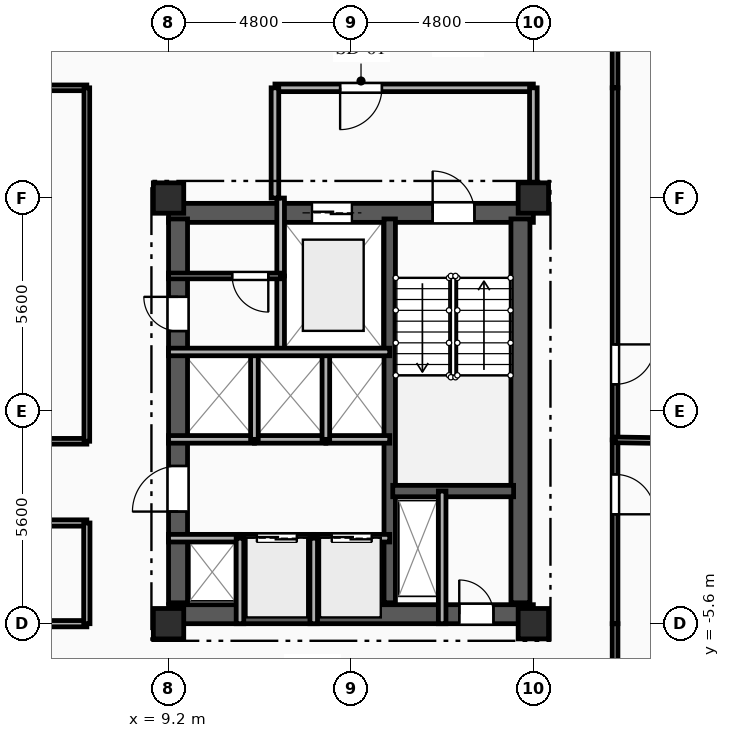
"""IFC4 building model, lengths in metres.
Left out: names, types, materials, properties, quantities, classifications, styles, units other than length and angle.
Written with IfcOpenShell. Run it as: python <this file> out.ifc"""

import sys

from ifc_helpers import new_model, si_unit, direction, frame, frame_2d, origin, origin_2d, place, context, subcontext, project, spatial, rectangle, extrude, element, fill, save


model = new_model("IFC4")
c1 = context("Model", 3, precision=1e-05, world=origin(), true_north=direction((0.0, 1.0)))
c2 = subcontext(c1, "Body", "Model", "MODEL_VIEW")
j1 = project(units=[si_unit("LENGTHUNIT", "METRE"), si_unit("PLANEANGLEUNIT", "RADIAN")], contexts=[c1])
p1 = place(None, origin())
s1 = spatial("IfcSite", under=j1, at=p1, CompositionType="ELEMENT")
p2 = place(p1, origin())
s2 = spatial("IfcBuilding", under=s1, at=p2, CompositionType="ELEMENT")
p3 = place(p2, frame((0.0, 0.0, 216.5)))
s3 = spatial("IfcBuildingStorey", under=s2, at=p3, CompositionType="ELEMENT", Elevation=216.5)
for number, where, z_axis, x_axis in (
    (1, (9.2, -5.6, 0.0), (0.0, 0.0, 1.0), (1.0, 0.0, 0.0)),
    (2, (9.2, 5.6, 0.0), (0.0, 0.0, 1.0), (1.0, 0.0, 0.0)),
    (3, (18.8, -5.6, 0.0), (0.0, 0.0, 1.0), (1.0, 0.0, 0.0)),
    (4, (18.8, 5.6, 0.0), (0.0, 0.0, 1.0), (1.0, 0.0, 0.0)),
):
    element("IfcColumn", number, at=place(p3, frame(where, z_axis=z_axis, x_axis=x_axis)), inside=s3, PredefinedType="COLUMN", context=c2, shape_type="SweptSolid", body=[
        extrude(rectangle(XDim=0.8, YDim=0.8, at=origin_2d()), origin(), (0.0, 0.0, 1.0), 3.35),
    ])
p4 = place(p3, frame((9.2, 5.21, 0.0), z_axis=(0.0, 0.0, 1.0), x_axis=(1.0, 0.0, 0.0)))
e5 = element("IfcWall", 5, at=p4, inside=s3, PredefinedType="SHEAR", context=c2, shape_type="SweptSolid", body=[
    extrude(rectangle(XDim=9.6, YDim=0.5, at=frame_2d((4.8, 0.0))), origin(), (0.0, 0.0, 1.0), 3.04),
])
p5 = place(p4, frame((6.95, 0.0, 0.0)))
e6 = element("IfcOpeningElement", 6, at=p5, cuts=e5, PredefinedType="OPENING", context=c2, shape_type="SweptSolid", body=[
    extrude(rectangle(XDim=1.1, YDim=2.15, at=frame_2d((0.55, 1.075))), frame((0.0, 0.26, 0.0), z_axis=(0.0, -1.0, 0.0), x_axis=(1.0, 0.0, 0.0)), (0.0, 0.0, 1.0), 0.52),
])
p6 = place(p4, frame((3.775, 0.0, 0.0)))
e7 = element("IfcOpeningElement", 7, at=p6, cuts=e5, PredefinedType="OPENING", context=c2, shape_type="SweptSolid", body=[
    extrude(rectangle(XDim=1.05, YDim=2.1, at=frame_2d((0.525, 1.05))), frame((0.0, 0.26, 0.0), z_axis=(0.0, -1.0, 0.0), x_axis=(1.0, 0.0, 0.0)), (0.0, 0.0, 1.0), 0.52),
])
p7 = place(p3, frame((9.2, -5.35, 0.0), z_axis=(0.0, 0.0, 1.0), x_axis=(1.0, 0.0, 0.0)))
e8 = element("IfcWall", 8, at=p7, inside=s3, PredefinedType="SHEAR", context=c2, shape_type="SweptSolid", body=[
    extrude(rectangle(XDim=9.6, YDim=0.5, at=frame_2d((4.8, 0.0))), origin(), (0.0, 0.0, 1.0), 3.04),
])
p8 = place(p7, frame((7.65, 0.0, 0.0)))
e9 = element("IfcOpeningElement", 9, at=p8, cuts=e8, PredefinedType="OPENING", context=c2, shape_type="SweptSolid", body=[
    extrude(rectangle(XDim=0.9, YDim=2.1, at=frame_2d((0.45, 1.05))), frame((0.0, 0.26, 0.0), z_axis=(0.0, -1.0, 0.0), x_axis=(1.0, 0.0, 0.0)), (0.0, 0.0, 1.0), 0.52),
])
p9 = place(p3, frame((9.45, -5.05, 0.0), z_axis=(0.0, 0.0, 1.0), x_axis=(0.0, 1.0, 0.0)))
e10 = element("IfcWall", 10, at=p9, inside=s3, PredefinedType="SHEAR", context=c2, shape_type="SweptSolid", body=[
    extrude(rectangle(XDim=10.1, YDim=0.5, at=frame_2d((5.05, 0.0))), origin(), (0.0, 0.0, 1.0), 3.04),
])
p10 = place(p9, frame((7.15, 0.0, 0.0)))
e11 = element("IfcOpeningElement", 11, at=p10, cuts=e10, PredefinedType="OPENING", context=c2, shape_type="SweptSolid", body=[
    extrude(rectangle(XDim=0.9, YDim=2.1, at=frame_2d((0.45, 1.05))), frame((0.0, 0.26, 0.0), z_axis=(0.0, -1.0, 0.0), x_axis=(1.0, 0.0, 0.0)), (0.0, 0.0, 1.0), 0.52),
])
p11 = place(p9, frame((2.4, 0.0, 0.0)))
e12 = element("IfcOpeningElement", 12, at=p11, cuts=e10, PredefinedType="OPENING", context=c2, shape_type="SweptSolid", body=[
    extrude(rectangle(XDim=1.2, YDim=2.15, at=frame_2d((0.6, 1.075))), frame((0.0, 0.26, 0.0), z_axis=(0.0, -1.0, 0.0), x_axis=(1.0, 0.0, 0.0)), (0.0, 0.0, 1.0), 0.52),
])
p12 = place(p3, frame((18.46, -5.05, 0.0), z_axis=(0.0, 0.0, 1.0), x_axis=(0.0, 1.0, 0.0)))
e13 = element("IfcWall", 13, at=p12, inside=s3, PredefinedType="SHEAR", context=c2, shape_type="SweptSolid", body=[
    extrude(rectangle(XDim=10.1, YDim=0.5, at=frame_2d((5.05, 0.0))), origin(), (0.0, 0.0, 1.0), 3.04),
])
p13 = place(p3, frame((15.02, -5.05, 0.0), z_axis=(0.0, 0.0, 1.0), x_axis=(0.0, 1.0, 0.0)))
e14 = element("IfcWall", 14, at=p13, inside=s3, PredefinedType="SHEAR", context=c2, shape_type="SweptSolid", body=[
    extrude(rectangle(XDim=10.1, YDim=0.3, at=frame_2d((5.05, 0.0))), origin(), (0.0, 0.0, 1.0), 3.04),
])
p14 = place(p3, frame((15.1, -2.11, 0.0), z_axis=(0.0, 0.0, 1.0), x_axis=(1.0, 0.0, 0.0)))
e15 = element("IfcWall", 15, at=p14, inside=s3, PredefinedType="SHEAR", context=c2, shape_type="SweptSolid", body=[
    extrude(rectangle(XDim=3.18, YDim=0.3, at=frame_2d((1.59, 0.0))), origin(), (0.0, 0.0, 1.0), 3.04),
])
p15 = place(p3, frame((16.4, -2.11, 0.0), z_axis=(0.0, 0.0, 1.0), x_axis=(0.0, -1.0, 0.0)))
e16 = element("IfcWall", 16, at=p15, inside=s3, PredefinedType="PARTITIONING", context=c2, shape_type="SweptSolid", body=[
    extrude(rectangle(XDim=3.49, YDim=0.2, at=frame_2d((1.745, 0.0))), origin(), (0.0, 0.0, 1.0), 3.04),
])
p16 = place(p3, frame((12.15, 3.55, 0.0), z_axis=(0.0, 0.0, 1.0), x_axis=(0.0, -1.0, 0.0)))
e17 = element("IfcWall", 17, at=p16, inside=s3, PredefinedType="PARTITIONING", context=c2, shape_type="SweptSolid", body=[
    extrude(rectangle(XDim=2.0, YDim=0.2, at=frame_2d((1.0, 0.0))), origin(), (0.0, 0.0, 1.0), 3.04),
])
p17 = place(p3, frame((12.15, 5.6, 0.0), z_axis=(0.0, 0.0, 1.0), x_axis=(0.0, -1.0, 0.0)))
e18 = element("IfcWall", 18, at=p17, inside=s3, PredefinedType="PARTITIONING", context=c2, shape_type="SweptSolid", body=[
    extrude(rectangle(XDim=2.05, YDim=0.2, at=frame_2d((1.025, 0.0))), origin(), (0.0, 0.0, 1.0), 3.04),
])
p18 = place(p3, frame((18.8, 8.5, 0.0), z_axis=(0.0, 0.0, 1.0), x_axis=(-1.0, 0.0, 0.0)))
e19 = element("IfcWall", 19, at=p18, inside=s3, PredefinedType="PARTITIONING", context=c2, shape_type="SweptSolid", body=[
    extrude(rectangle(XDim=6.8, YDim=0.2, at=frame_2d((3.4, 0.0))), origin(), (0.0, 0.0, 1.0), 3.04),
])
p19 = place(p18, frame((3.985, 0.0, 0.0)))
e20 = element("IfcOpeningElement", 20, at=p19, cuts=e19, PredefinedType="OPENING", context=c2, shape_type="SweptSolid", body=[
    extrude(rectangle(XDim=1.1, YDim=2.15, at=frame_2d((0.55, 1.075))), frame((0.0, 0.11, 0.0), z_axis=(0.0, -1.0, 0.0), x_axis=(1.0, 0.0, 0.0)), (0.0, 0.0, 1.0), 0.22),
])
p20 = place(p3, frame((18.8, 5.6, 0.0), z_axis=(0.0, 0.0, 1.0), x_axis=(0.0, 1.0, 0.0)))
e21 = element("IfcWall", 21, at=p20, inside=s3, PredefinedType="PARTITIONING", context=c2, shape_type="SweptSolid", body=[
    extrude(rectangle(XDim=2.9, YDim=0.2, at=frame_2d((1.45, 0.0))), origin(), (0.0, 0.0, 1.0), 2.665),
])
p21 = place(p3, frame((12.0, 8.5, 0.0), z_axis=(0.0, 0.0, 1.0), x_axis=(0.0, -1.0, 0.0)))
e22 = element("IfcWall", 22, at=p21, inside=s3, PredefinedType="PARTITIONING", context=c2, shape_type="SweptSolid", body=[
    extrude(rectangle(XDim=2.9, YDim=0.2, at=frame_2d((1.45, 0.0))), origin(), (0.0, 0.0, 1.0), 3.04),
])
p22 = place(p3, frame((12.15, 3.55, 0.0), z_axis=(0.0, 0.0, 1.0), x_axis=(-1.0, 0.0, 0.0)))
e23 = element("IfcWall", 23, at=p22, inside=s3, PredefinedType="PARTITIONING", context=c2, shape_type="SweptSolid", body=[
    extrude(rectangle(XDim=2.95, YDim=0.15, at=frame_2d((1.475, 0.0))), origin(), (0.0, 0.0, 1.0), 3.04),
])
p23 = place(p22, frame((0.325, 0.0, 0.0)))
e24 = element("IfcOpeningElement", 24, at=p23, cuts=e23, PredefinedType="OPENING", context=c2, shape_type="SweptSolid", body=[
    extrude(rectangle(XDim=0.95, YDim=2.1, at=frame_2d((0.475, 1.05))), frame((0.0, 0.085, 0.0), z_axis=(0.0, -1.0, 0.0), x_axis=(1.0, 0.0, 0.0)), (0.0, 0.0, 1.0), 0.17),
])
p24 = place(p3, frame((9.2, -3.35, 0.0), z_axis=(0.0, 0.0, 1.0), x_axis=(1.0, 0.0, 0.0)))
e25 = element("IfcWall", 25, at=p24, inside=s3, PredefinedType="PARTITIONING", context=c2, shape_type="SweptSolid", body=[
    extrude(rectangle(XDim=1.88, YDim=0.2, at=frame_2d((0.94, 0.0))), origin(), (0.0, 0.0, 1.0), 2.755),
])
p25 = place(p3, frame((11.08, -3.35, 0.0), z_axis=(0.0, 0.0, 1.0), x_axis=(1.0, 0.0, 0.0)))
e26 = element("IfcWall", 26, at=p25, inside=s3, PredefinedType="PARTITIONING", context=c2, shape_type="SweptSolid", body=[
    extrude(rectangle(XDim=1.94, YDim=0.2, at=frame_2d((0.97, 0.0))), origin(), (0.0, 0.0, 1.0), 3.04),
])
p26 = place(p25, frame((0.445, 0.0, 0.0)))
e27 = element("IfcOpeningElement", 27, at=p26, cuts=e26, PredefinedType="OPENING", context=c2, shape_type="SweptSolid", body=[
    extrude(rectangle(XDim=1.05, YDim=2.1, at=frame_2d((0.525, 1.05))), frame((0.0, 0.11, 0.0), z_axis=(0.0, -1.0, 0.0), x_axis=(1.0, 0.0, 0.0)), (0.0, 0.0, 1.0), 0.22),
])
p27 = place(p3, frame((13.02, -3.35, 0.0), z_axis=(0.0, 0.0, 1.0), x_axis=(1.0, 0.0, 0.0)))
e28 = element("IfcWall", 28, at=p27, inside=s3, PredefinedType="PARTITIONING", context=c2, shape_type="SweptSolid", body=[
    extrude(rectangle(XDim=2.0, YDim=0.2, at=frame_2d((1.0, 0.0))), origin(), (0.0, 0.0, 1.0), 3.04),
])
p28 = place(p27, frame((0.475, 0.0, 0.0)))
e29 = element("IfcOpeningElement", 29, at=p28, cuts=e28, PredefinedType="OPENING", context=c2, shape_type="SweptSolid", body=[
    extrude(rectangle(XDim=1.05, YDim=2.1, at=frame_2d((0.525, 1.05))), frame((0.0, 0.11, 0.0), z_axis=(0.0, -1.0, 0.0), x_axis=(1.0, 0.0, 0.0)), (0.0, 0.0, 1.0), 0.22),
])
p29 = place(p3, frame((11.46, -0.75, 0.0), z_axis=(0.0, 0.0, 1.0), x_axis=(-1.0, 0.0, 0.0)))
e30 = element("IfcWall", 30, at=p29, inside=s3, PredefinedType="PARTITIONING", context=c2, shape_type="SweptSolid", body=[
    extrude(rectangle(XDim=2.26, YDim=0.2, at=frame_2d((1.13, 0.0))), origin(), (0.0, 0.0, 1.0), 3.04),
])
p30 = place(p3, frame((13.34, -0.75, 0.0), z_axis=(0.0, 0.0, 1.0), x_axis=(-1.0, 0.0, 0.0)))
e31 = element("IfcWall", 31, at=p30, inside=s3, PredefinedType="PARTITIONING", context=c2, shape_type="SweptSolid", body=[
    extrude(rectangle(XDim=1.88, YDim=0.2, at=frame_2d((0.94, 0.0))), origin(), (0.0, 0.0, 1.0), 3.04),
])
p31 = place(p3, frame((15.02, -0.75, 0.0), z_axis=(0.0, 0.0, 1.0), x_axis=(-1.0, 0.0, 0.0)))
e32 = element("IfcWall", 32, at=p31, inside=s3, PredefinedType="PARTITIONING", context=c2, shape_type="SweptSolid", body=[
    extrude(rectangle(XDim=1.68, YDim=0.2, at=frame_2d((0.84, 0.0))), origin(), (0.0, 0.0, 1.0), 3.04),
])
for number, where, z_axis, x_axis in (
    (33, (11.08, -5.6, 0.0), (0.0, 0.0, 1.0), (0.0, 1.0, 0.0)),
    (34, (13.02, -5.6, 0.0), (0.0, 0.0, 1.0), (0.0, 1.0, 0.0)),
):
    element("IfcWall", number, at=place(p3, frame(where, z_axis=z_axis, x_axis=x_axis)), inside=s3, PredefinedType="PARTITIONING", context=c2, shape_type="SweptSolid", body=[
        extrude(rectangle(XDim=2.25, YDim=0.2, at=frame_2d((1.125, 0.0))), origin(), (0.0, 0.0, 1.0), 3.04),
    ])
for number, where, z_axis, x_axis in (
    (35, (11.46, -0.75, 0.0), (0.0, 0.0, 1.0), (0.0, 1.0, 0.0)),
    (36, (13.34, -0.75, 0.0), (0.0, 0.0, 1.0), (0.0, 1.0, 0.0)),
):
    element("IfcWall", number, at=place(p3, frame(where, z_axis=z_axis, x_axis=x_axis)), inside=s3, PredefinedType="PARTITIONING", context=c2, shape_type="SweptSolid", body=[
        extrude(rectangle(XDim=2.3, YDim=0.2, at=frame_2d((1.15, 0.0))), origin(), (0.0, 0.0, 1.0), 3.04),
    ])
p32 = place(p3, frame((20.95, 10.65, 0.0), z_axis=(0.0, 0.0, 1.0), x_axis=(0.0, -1.0, 0.0)))
e37 = element("IfcWall", 37, at=p32, inside=s3, PredefinedType="PARTITIONING", context=c2, shape_type="SweptSolid", body=[
    extrude(rectangle(XDim=2.15, YDim=0.15, at=frame_2d((1.075, 0.0))), origin(), (0.0, 0.0, 1.0), 3.04),
])
p33 = place(p3, frame((7.05, 8.5, 0.0), z_axis=(0.0, 0.0, 1.0), x_axis=(-1.0, 0.0, 0.0)))
e38 = element("IfcWall", 38, at=p33, inside=s3, PredefinedType="PARTITIONING", context=c2, shape_type="SweptSolid", body=[
    extrude(rectangle(XDim=7.05, YDim=0.15, at=frame_2d((3.525, 0.0))), origin(), (0.0, 0.0, 1.0), 3.04),
])
p34 = place(p3, frame((20.95, -5.6, 0.0), z_axis=(0.0, 0.0, 1.0), x_axis=(0.0, -1.0, 0.0)))
e39 = element("IfcWall", 39, at=p34, inside=s3, PredefinedType="PARTITIONING", context=c2, shape_type="SweptSolid", body=[
    extrude(rectangle(XDim=2.15, YDim=0.15, at=frame_2d((1.075, 0.0))), origin(), (0.0, 0.0, 1.0), 3.04),
])
p35 = place(p3, frame((0.0, -5.6, 0.0), z_axis=(0.0, 0.0, 1.0), x_axis=(1.0, 0.0, 0.0)))
e40 = element("IfcWall", 40, at=p35, inside=s3, PredefinedType="PARTITIONING", context=c2, shape_type="SweptSolid", body=[
    extrude(rectangle(XDim=7.05, YDim=0.165, at=frame_2d((3.525, 0.0))), origin(), (0.0, 0.0, 1.0), 2.525),
])
p36 = place(p3, frame((20.95, -0.763, 0.0), z_axis=(0.0, 0.0, 1.0), x_axis=(0.0, -1.0, 0.0)))
e41 = element("IfcWall", 41, at=p36, inside=s3, PredefinedType="PARTITIONING", context=c2, shape_type="SweptSolid", body=[
    extrude(rectangle(XDim=4.837, YDim=0.15, at=frame_2d((2.418, 0.0))), origin(), (0.0, 0.0, 1.0), 2.695),
])
p37 = place(p36, frame((0.908, 0.0, 0.0)))
e42 = element("IfcOpeningElement", 42, at=p37, cuts=e41, PredefinedType="OPENING", context=c2, shape_type="SweptSolid", body=[
    extrude(rectangle(XDim=1.05, YDim=2.15, at=frame_2d((0.525, 1.075))), frame((0.0, 0.085, 0.0), z_axis=(0.0, -1.0, 0.0), x_axis=(1.0, 0.0, 0.0)), (0.0, 0.0, 1.0), 0.17),
])
p38 = place(p3, frame((20.95, 8.5, 0.0), z_axis=(0.0, 0.0, 1.0), x_axis=(0.0, -1.0, 0.0)))
e43 = element("IfcWall", 43, at=p38, inside=s3, PredefinedType="PARTITIONING", context=c2, shape_type="SweptSolid", body=[
    extrude(rectangle(XDim=9.263, YDim=0.15, at=frame_2d((4.632, 0.0))), origin(), (0.0, 0.0, 1.0), 2.695),
])
p39 = place(p38, frame((6.751, 0.0, 0.0)))
e44 = element("IfcOpeningElement", 44, at=p39, cuts=e43, PredefinedType="OPENING", context=c2, shape_type="SweptSolid", body=[
    extrude(rectangle(XDim=1.05, YDim=2.15, at=frame_2d((0.525, 1.075))), frame((0.0, 0.085, 0.0), z_axis=(0.0, -1.0, 0.0), x_axis=(1.0, 0.0, 0.0)), (0.0, 0.0, 1.0), 0.17),
])
p40 = place(p3, frame((-7.05, -0.8, 0.0), z_axis=(0.0, 0.0, 1.0), x_axis=(1.0, 0.0, 0.0)))
e45 = element("IfcWall", 45, at=p40, inside=s3, PredefinedType="PARTITIONING", context=c2, shape_type="SweptSolid", body=[
    extrude(rectangle(XDim=14.1, YDim=0.15, at=frame_2d((7.05, 0.0))), origin(), (0.0, 0.0, 1.0), 3.04),
])
p41 = place(p40, frame((6.525, 0.0, 0.0)))
e46 = element("IfcOpeningElement", 46, at=p41, cuts=e45, PredefinedType="OPENING", context=c2, shape_type="SweptSolid", body=[
    extrude(rectangle(XDim=1.05, YDim=2.15, at=frame_2d((0.525, 1.075))), frame((0.0, 0.085, 0.0), z_axis=(0.0, -1.0, 0.0), x_axis=(1.0, 0.0, 0.0)), (0.0, 0.0, 1.0), 0.17),
])
p42 = place(p3, frame((7.05, -2.95, 0.0), z_axis=(0.0, 0.0, 1.0), x_axis=(-1.0, 0.0, 0.0)))
e47 = element("IfcWall", 47, at=p42, inside=s3, PredefinedType="PARTITIONING", context=c2, shape_type="SweptSolid", body=[
    extrude(rectangle(XDim=14.1, YDim=0.165, at=frame_2d((7.05, 0.0))), origin(), (0.0, 0.0, 1.0), 3.04),
])
p43 = place(p42, frame((6.475, 0.0, 0.0)))
e48 = element("IfcOpeningElement", 48, at=p43, cuts=e47, PredefinedType="OPENING", context=c2, shape_type="SweptSolid", body=[
    extrude(rectangle(XDim=1.15, YDim=2.15, at=frame_2d((0.575, 1.075))), frame((0.0, 0.093, 0.0), z_axis=(0.0, -1.0, 0.0), x_axis=(1.0, 0.0, 0.0)), (0.0, 0.0, 1.0), 0.185),
])
p44 = place(p3, frame((7.05, -0.8, 0.0), z_axis=(0.0, 0.0, 1.0), x_axis=(0.0, 1.0, 0.0)))
e49 = element("IfcWall", 49, at=p44, inside=s3, PredefinedType="PARTITIONING", context=c2, shape_type="SweptSolid", body=[
    extrude(rectangle(XDim=9.3, YDim=0.15, at=frame_2d((4.65, 0.0))), origin(), (0.0, 0.0, 1.0), 3.04),
])
p45 = place(p3, frame((7.05, -5.6, 0.0), z_axis=(0.0, 0.0, 1.0), x_axis=(0.0, 1.0, 0.0)))
e50 = element("IfcWall", 50, at=p45, inside=s3, PredefinedType="PARTITIONING", context=c2, shape_type="SweptSolid", body=[
    extrude(rectangle(XDim=2.65, YDim=0.165, at=frame_2d((1.325, 0.0))), origin(), (0.0, 0.0, 1.0), 3.04),
])
p46 = place(p3, frame((20.95, -0.763, 0.0), z_axis=(0.0, 0.0, 1.0), x_axis=(0.999875696831, -0.015766765259, 0.0)))
e51 = element("IfcWall", 51, at=p46, inside=s3, PredefinedType="PARTITIONING", context=c2, shape_type="SweptSolid", body=[
    extrude(rectangle(XDim=2.787, YDim=0.15, at=frame_2d((1.394, 0.0))), origin(), (0.0, 0.0, 1.0), 3.04),
])
p47 = place(p3, frame((9.2, 1.55, 0.0), z_axis=(0.0, 0.0, 1.0), x_axis=(1.0, 0.0, 0.0)))
e52 = element("IfcWall", 52, at=p47, inside=s3, PredefinedType="PARTITIONING", context=c2, shape_type="SweptSolid", body=[
    extrude(rectangle(XDim=5.82, YDim=0.2, at=frame_2d((2.91, 0.0))), origin(), (0.0, 0.0, 1.0), 3.04),
])
p48 = place(p5, origin())
e53 = element("IfcDoor", 53, at=p48, inside=s3, OperationType="SINGLE_SWING_LEFT", PredefinedType="DOOR", context=c2, shape_type="SweptSolid", body=[
    extrude(rectangle(XDim=1.1, YDim=2.15, at=frame_2d((0.55, 1.075))), frame((0.0, 0.025, 0.0), z_axis=(0.0, -1.0, 0.0), x_axis=(1.0, 0.0, 0.0)), (0.0, 0.0, 1.0), 0.05),
])
fill(e6, e53)
p49 = place(p6, origin())
e54 = element("IfcDoor", 54, at=p49, inside=s3, OperationType="DOUBLE_DOOR_SLIDING", PredefinedType="DOOR", context=c2, shape_type="SweptSolid", body=[
    extrude(rectangle(XDim=1.05, YDim=2.1, at=frame_2d((0.525, 1.05))), frame((0.0, 0.025, 0.0), z_axis=(0.0, -1.0, 0.0), x_axis=(1.0, 0.0, 0.0)), (0.0, 0.0, 1.0), 0.05),
])
fill(e7, e54)
p50 = place(p8, origin())
e55 = element("IfcDoor", 55, at=p50, inside=s3, OperationType="SINGLE_SWING_LEFT", PredefinedType="DOOR", context=c2, shape_type="SweptSolid", body=[
    extrude(rectangle(XDim=0.9, YDim=2.1, at=frame_2d((0.45, 1.05))), frame((0.0, 0.025, 0.0), z_axis=(0.0, -1.0, 0.0), x_axis=(1.0, 0.0, 0.0)), (0.0, 0.0, 1.0), 0.05),
])
fill(e9, e55)
p51 = place(p19, origin())
e56 = element("IfcDoor", 56, at=p51, inside=s3, OperationType="SINGLE_SWING_RIGHT", PredefinedType="DOOR", context=c2, shape_type="SweptSolid", body=[
    extrude(rectangle(XDim=1.1, YDim=2.15, at=frame_2d((0.55, 1.075))), frame((0.0, 0.025, 0.0), z_axis=(0.0, -1.0, 0.0), x_axis=(1.0, 0.0, 0.0)), (0.0, 0.0, 1.0), 0.05),
])
fill(e20, e56)
p52 = place(p23, origin())
e57 = element("IfcDoor", 57, at=p52, inside=s3, OperationType="SINGLE_SWING_LEFT", PredefinedType="DOOR", context=c2, shape_type="SweptSolid", body=[
    extrude(rectangle(XDim=0.95, YDim=2.1, at=frame_2d((0.475, 1.05))), frame((0.0, 0.025, 0.0), z_axis=(0.0, -1.0, 0.0), x_axis=(1.0, 0.0, 0.0)), (0.0, 0.0, 1.0), 0.05),
])
fill(e24, e57)
p53 = place(p10, origin())
e58 = element("IfcDoor", 58, at=p53, inside=s3, OperationType="SINGLE_SWING_RIGHT", PredefinedType="DOOR", context=c2, shape_type="SweptSolid", body=[
    extrude(rectangle(XDim=0.9, YDim=2.1, at=frame_2d((0.45, 1.05))), frame((0.0, 0.025, 0.0), z_axis=(0.0, -1.0, 0.0), x_axis=(1.0, 0.0, 0.0)), (0.0, 0.0, 1.0), 0.05),
])
fill(e11, e58)
p54 = place(p26, origin())
e59 = element("IfcDoor", 59, at=p54, inside=s3, OperationType="DOUBLE_DOOR_SLIDING", PredefinedType="DOOR", context=c2, shape_type="SweptSolid", body=[
    extrude(rectangle(XDim=1.05, YDim=2.1, at=frame_2d((0.525, 1.05))), frame((0.0, 0.025, 0.0), z_axis=(0.0, -1.0, 0.0), x_axis=(1.0, 0.0, 0.0)), (0.0, 0.0, 1.0), 0.05),
])
fill(e27, e59)
p55 = place(p28, origin())
e60 = element("IfcDoor", 60, at=p55, inside=s3, OperationType="DOUBLE_DOOR_SLIDING", PredefinedType="DOOR", context=c2, shape_type="SweptSolid", body=[
    extrude(rectangle(XDim=1.05, YDim=2.1, at=frame_2d((0.525, 1.05))), frame((0.0, 0.025, 0.0), z_axis=(0.0, -1.0, 0.0), x_axis=(1.0, 0.0, 0.0)), (0.0, 0.0, 1.0), 0.05),
])
fill(e29, e60)
p56 = place(p11, origin())
e61 = element("IfcDoor", 61, at=p56, inside=s3, OperationType="SINGLE_SWING_LEFT", PredefinedType="DOOR", context=c2, shape_type="SweptSolid", body=[
    extrude(rectangle(XDim=1.2, YDim=2.15, at=frame_2d((0.6, 1.075))), frame((0.0, 0.025, 0.0), z_axis=(0.0, -1.0, 0.0), x_axis=(1.0, 0.0, 0.0)), (0.0, 0.0, 1.0), 0.05),
])
fill(e12, e61)
p57 = place(p37, origin())
e62 = element("IfcDoor", 62, at=p57, inside=s3, OperationType="SINGLE_SWING_RIGHT", PredefinedType="DOOR", context=c2, shape_type="SweptSolid", body=[
    extrude(rectangle(XDim=1.05, YDim=2.15, at=frame_2d((0.525, 1.075))), frame((0.0, 0.025, 0.0), z_axis=(0.0, -1.0, 0.0), x_axis=(1.0, 0.0, 0.0)), (0.0, 0.0, 1.0), 0.05),
])
fill(e42, e62)
p58 = place(p39, origin())
e63 = element("IfcDoor", 63, at=p58, inside=s3, OperationType="SINGLE_SWING_LEFT", PredefinedType="DOOR", context=c2, shape_type="SweptSolid", body=[
    extrude(rectangle(XDim=1.05, YDim=2.15, at=frame_2d((0.525, 1.075))), frame((0.0, 0.025, 0.0), z_axis=(0.0, -1.0, 0.0), x_axis=(1.0, 0.0, 0.0)), (0.0, 0.0, 1.0), 0.05),
])
fill(e44, e63)
save(model, sys.argv[1])
